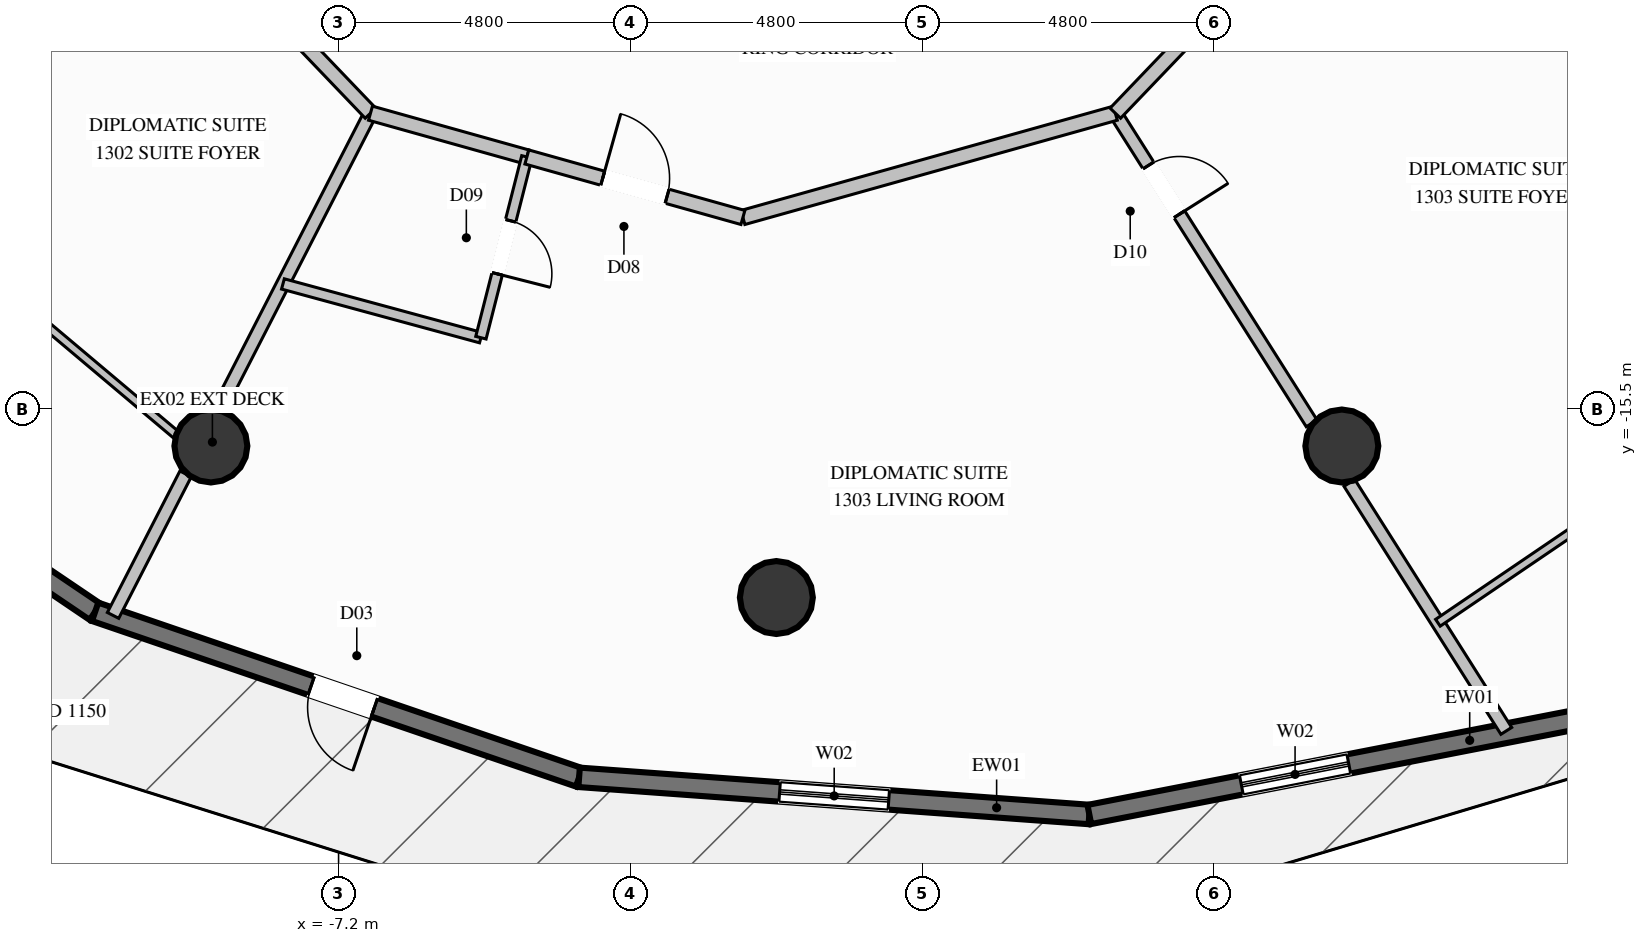
"""IFC4 building model, lengths in metres.
Left out: names, types, materials, properties, quantities, classifications, styles, units other than length and angle.
Written with IfcOpenShell. Run it as: python <this file> out.ifc"""

import sys

from ifc_helpers import new_model, si_unit, direction, frame, frame_2d, origin, origin_2d, place, context, subcontext, project, spatial, rectangle, circle, extrude, element, fill, save


model = new_model("IFC4")
c1 = context("Model", 3, precision=1e-05, world=origin(), true_north=direction((0.0, 1.0)))
c2 = subcontext(c1, "Body", "Model", "MODEL_VIEW")
j1 = project(units=[si_unit("LENGTHUNIT", "METRE"), si_unit("PLANEANGLEUNIT", "RADIAN")], contexts=[c1])
p1 = place(None, origin())
s1 = spatial("IfcSite", under=j1, at=p1, CompositionType="ELEMENT")
p2 = place(p1, origin())
s2 = spatial("IfcBuilding", under=s1, at=p2, CompositionType="ELEMENT")
p3 = place(p2, frame((0.0, 0.0, 50.0)))
s3 = spatial("IfcBuildingStorey", under=s2, at=p3, CompositionType="ELEMENT", Elevation=50.0)
for number, where, z_axis, x_axis in (
    (1, (-9.3, -16.108, 0.0), (0.0, 0.0, 1.0), (1.0, 0.0, 0.0)),
    (2, (0.0, -18.6, 0.0), (0.0, 0.0, 1.0), (1.0, 0.0, 0.0)),
    (3, (9.3, -16.108, 0.0), (0.0, 0.0, 1.0), (1.0, 0.0, 0.0)),
):
    element("IfcColumn", number, at=place(p3, frame(where, z_axis=z_axis, x_axis=x_axis)), inside=s3, PredefinedType="COLUMN", context=c2, shape_type="SweptSolid", body=[
        extrude(circle(Radius=0.6, at=origin_2d()), origin(), (0.0, 0.0, 1.0), 3.6),
    ])
p4 = place(p3, frame((-11.204, -18.835, 0.0), z_axis=(0.0, 0.0, 1.0), x_axis=(-0.828391352283, 0.560149772349, 0.0)))
e4 = element("IfcWall", 4, at=p4, inside=s3, PredefinedType="SOLIDWALL", context=c2, shape_type="SweptSolid", body=[
    extrude(rectangle(XDim=8.149, YDim=0.32, at=frame_2d((4.075, 0.0))), origin(), (0.0, 0.0, 1.0), 3.34),
])
p5 = place(p4, frame((3.175, 0.0, 0.35)))
e5 = element("IfcOpeningElement", 5, at=p5, cuts=e4, PredefinedType="OPENING", context=c2, shape_type="SweptSolid", body=[
    extrude(rectangle(XDim=1.8, YDim=2.6, at=frame_2d((0.9, 1.3))), frame((0.0, 0.17, 0.0), z_axis=(0.0, -1.0, 0.0), x_axis=(1.0, 0.0, 0.0)), (0.0, 0.0, 1.0), 0.34),
])
p6 = place(p3, frame((-3.244, -21.557, 0.0), z_axis=(0.0, 0.0, 1.0), x_axis=(-0.94621145459, 0.323548888429, 0.0)))
e6 = element("IfcWall", 6, at=p6, inside=s3, PredefinedType="SOLIDWALL", context=c2, shape_type="SweptSolid", body=[
    extrude(rectangle(XDim=8.413, YDim=0.32, at=frame_2d((4.206, 0.0))), origin(), (0.0, 0.0, 1.0), 3.34),
])
p7 = place(p6, frame((3.557, 0.0, 0.0)))
e7 = element("IfcOpeningElement", 7, at=p7, cuts=e6, PredefinedType="OPENING", context=c2, shape_type="SweptSolid", body=[
    extrude(rectangle(XDim=1.1, YDim=2.2, at=frame_2d((0.55, 1.1))), frame((0.0, 0.17, 0.0), z_axis=(0.0, -1.0, 0.0), x_axis=(1.0, 0.0, 0.0)), (0.0, 0.0, 1.0), 0.34),
])
p8 = place(p3, frame((5.147, -22.168, 0.0), z_axis=(0.0, 0.0, 1.0), x_axis=(-0.997358597799, 0.072634891044, 0.0)))
e8 = element("IfcWall", 8, at=p8, inside=s3, PredefinedType="SOLIDWALL", context=c2, shape_type="SweptSolid", body=[
    extrude(rectangle(XDim=8.413, YDim=0.32, at=frame_2d((4.207, 0.0))), origin(), (0.0, 0.0, 1.0), 3.34),
])
p9 = place(p8, frame((3.307, 0.0, 0.35)))
e9 = element("IfcOpeningElement", 9, at=p9, cuts=e8, PredefinedType="OPENING", context=c2, shape_type="SweptSolid", body=[
    extrude(rectangle(XDim=1.8, YDim=2.6, at=frame_2d((0.9, 1.3))), frame((0.0, 0.17, 0.0), z_axis=(0.0, -1.0, 0.0), x_axis=(1.0, 0.0, 0.0)), (0.0, 0.0, 1.0), 0.34),
])
p10 = place(p3, frame((13.146, -20.609, 0.0), z_axis=(0.0, 0.0, 1.0), x_axis=(-0.981529850993, -0.191309047382, 0.0)))
e10 = element("IfcWall", 10, at=p10, inside=s3, PredefinedType="SOLIDWALL", context=c2, shape_type="SweptSolid", body=[
    extrude(rectangle(XDim=8.15, YDim=0.32, at=frame_2d((4.075, 0.0))), origin(), (0.0, 0.0, 1.0), 3.34),
])
p11 = place(p10, frame((3.802, 0.0, 0.35)))
e11 = element("IfcOpeningElement", 11, at=p11, cuts=e10, PredefinedType="OPENING", context=c2, shape_type="SweptSolid", body=[
    extrude(rectangle(XDim=1.8, YDim=2.6, at=frame_2d((0.9, 1.3))), frame((0.0, 0.17, 0.0), z_axis=(0.0, -1.0, 0.0), x_axis=(1.0, 0.0, 0.0)), (0.0, 0.0, 1.0), 0.34),
])
p12 = place(p3, frame((-6.675, -10.635, 0.0), z_axis=(0.0, 0.0, 1.0), x_axis=(-0.456172544556, -0.889891347072, 0.0)))
e12 = element("IfcWall", 12, at=p12, inside=s3, PredefinedType="PARTITIONING", context=c2, shape_type="SweptSolid", body=[
    extrude(rectangle(XDim=5.469, YDim=0.21, at=frame_2d((2.735, 0.0))), origin(), (0.0, 0.0, 1.0), 2.708),
])
p13 = place(p3, frame((-9.716, -16.567, 0.0), z_axis=(0.0, 0.0, 1.0), x_axis=(-0.456153637775, -0.889901038737, 0.0)))
e13 = element("IfcWall", 13, at=p13, inside=s3, PredefinedType="PARTITIONING", context=c2, shape_type="SweptSolid", body=[
    extrude(rectangle(XDim=2.615, YDim=0.21, at=frame_2d((1.308, 0.0))), origin(), (0.0, 0.0, 1.0), 3.34),
])
p14 = place(p3, frame((5.575, -10.635, 0.0), z_axis=(0.0, 0.0, 1.0), x_axis=(0.534853877246, -0.844944572144, 0.0)))
e14 = element("IfcWall", 14, at=p14, inside=s3, PredefinedType="PARTITIONING", context=c2, shape_type="SweptSolid", body=[
    extrude(rectangle(XDim=6.037, YDim=0.21, at=frame_2d((3.019, 0.0))), origin(), (0.0, 0.0, 1.0), 2.708),
])
p15 = place(p14, frame((1.017, 0.0, 0.0)))
e15 = element("IfcOpeningElement", 15, at=p15, cuts=e14, PredefinedType="OPENING", context=c2, shape_type="SweptSolid", body=[
    extrude(rectangle(XDim=0.95, YDim=2.1, at=frame_2d((0.475, 1.05))), frame((0.0, 0.115, 0.0), z_axis=(0.0, -1.0, 0.0), x_axis=(1.0, 0.0, 0.0)), (0.0, 0.0, 1.0), 0.23),
])
p16 = place(p3, frame((9.424, -16.715, 0.0), z_axis=(0.0, 0.0, 1.0), x_axis=(0.534778847244, -0.844992061821, 0.0)))
e16 = element("IfcWall", 16, at=p16, inside=s3, PredefinedType="PARTITIONING", context=c2, shape_type="SweptSolid", body=[
    extrude(rectangle(XDim=4.826, YDim=0.21, at=frame_2d((2.413, 0.0))), origin(), (0.0, 0.0, 1.0), 3.34),
])
p17 = place(p3, frame((-11.159, -5.95, 0.0), z_axis=(0.0, 0.0, 1.0), x_axis=(0.691426053968, -0.722447238138, 0.0)))
e17 = element("IfcWall", 17, at=p17, inside=s3, PredefinedType="PARTITIONING", context=c2, shape_type="SweptSolid", body=[
    extrude(rectangle(XDim=6.485, YDim=0.24, at=frame_2d((3.242, 0.0))), origin(), (0.0, 0.0, 1.0), 3.34),
])
p18 = place(p3, frame((-17.187, -9.763, 0.0), z_axis=(0.0, 0.0, 1.0), x_axis=(0.764837174909, -0.644223638092, 0.0)))
e18 = element("IfcWall", 18, at=p18, inside=s3, PredefinedType="PARTITIONING", context=c2, shape_type="SweptSolid", body=[
    extrude(rectangle(XDim=10.007, YDim=0.135, at=frame_2d((5.004, 0.0))), origin(), (0.0, 0.0, 1.0), 2.792),
])
p19 = place(p18, frame((4.529, 0.0, 0.0)))
e19 = element("IfcOpeningElement", 19, at=p19, cuts=e18, PredefinedType="OPENING", context=c2, shape_type="SweptSolid", body=[
    extrude(rectangle(XDim=0.95, YDim=2.1, at=frame_2d((0.475, 1.05))), frame((0.0, 0.078, 0.0), z_axis=(0.0, -1.0, 0.0), x_axis=(1.0, 0.0, 0.0)), (0.0, 0.0, 1.0), 0.155),
])
p20 = place(p3, frame((-6.675, -10.635, 0.0), z_axis=(0.0, 0.0, 1.0), x_axis=(0.962983004146, -0.269562114782, 0.0)))
e20 = element("IfcWall", 20, at=p20, inside=s3, PredefinedType="PARTITIONING", context=c2, shape_type="SweptSolid", body=[
    extrude(rectangle(XDim=2.671, YDim=0.24, at=frame_2d((1.335, 0.0))), origin(), (0.0, 0.0, 1.0), 3.34),
])
p21 = place(p3, frame((-8.115, -13.443, 0.0), z_axis=(0.0, 0.0, 1.0), x_axis=(0.96508205858, -0.261947743275, 0.0)))
e21 = element("IfcWall", 21, at=p21, inside=s3, PredefinedType="PLUMBINGWALL", context=c2, shape_type="SweptSolid", body=[
    extrude(rectangle(XDim=3.374, YDim=0.175, at=frame_2d((1.687, 0.0))), origin(), (0.0, 0.0, 1.0), 3.34),
])
p22 = place(p3, frame((-4.103, -11.355, 0.0), z_axis=(0.0, 0.0, 1.0), x_axis=(-0.246486233644, -0.969146292684, 0.0)))
e22 = element("IfcWall", 22, at=p22, inside=s3, PredefinedType="PLUMBINGWALL", context=c2, shape_type="SweptSolid", body=[
    extrude(rectangle(XDim=3.067, YDim=0.175, at=frame_2d((1.533, 0.0))), origin(), (0.0, 0.0, 1.0), 3.34),
])
p23 = place(p22, frame((1.083, 0.0, 0.0)))
e23 = element("IfcOpeningElement", 23, at=p23, cuts=e22, PredefinedType="OPENING", context=c2, shape_type="SweptSolid", body=[
    extrude(rectangle(XDim=0.9, YDim=2.1, at=frame_2d((0.45, 1.05))), frame((0.0, 0.098, 0.0), z_axis=(0.0, -1.0, 0.0), x_axis=(1.0, 0.0, 0.0)), (0.0, 0.0, 1.0), 0.195),
])
p24 = place(p3, frame((-0.55, -12.35, 0.0), z_axis=(0.0, 0.0, 1.0), x_axis=(0.962960431872, 0.269642738915, 0.0)))
e24 = element("IfcWall", 24, at=p24, inside=s3, PredefinedType="PARTITIONING", context=c2, shape_type="SweptSolid", body=[
    extrude(rectangle(XDim=6.361, YDim=0.24, at=frame_2d((3.18, 0.0))), origin(), (0.0, 0.0, 1.0), 2.919),
])
p25 = place(p3, frame((-4.103, -11.355, 0.0), z_axis=(0.0, 0.0, 1.0), x_axis=(0.962944088122, -0.269701099648, 0.0)))
e25 = element("IfcWall", 25, at=p25, inside=s3, PredefinedType="PARTITIONING", context=c2, shape_type="SweptSolid", body=[
    extrude(rectangle(XDim=3.69, YDim=0.24, at=frame_2d((1.845, 0.0))), origin(), (0.0, 0.0, 1.0), 2.919),
])
p26 = place(p25, frame((1.295, 0.0, 0.0)))
e26 = element("IfcOpeningElement", 26, at=p26, cuts=e25, PredefinedType="OPENING", context=c2, shape_type="SweptSolid", body=[
    extrude(rectangle(XDim=1.1, YDim=2.3, at=frame_2d((0.55, 1.15))), frame((0.0, 0.13, 0.0), z_axis=(0.0, -1.0, 0.0), x_axis=(1.0, 0.0, 0.0)), (0.0, 0.0, 1.0), 0.26),
])
p27 = place(p3, frame((5.575, -10.635, 0.0), z_axis=(0.0, 0.0, 1.0), x_axis=(0.691445702336, 0.722428432941, 0.0)))
e27 = element("IfcWall", 27, at=p27, inside=s3, PredefinedType="PARTITIONING", context=c2, shape_type="SweptSolid", body=[
    extrude(rectangle(XDim=6.485, YDim=0.24, at=frame_2d((3.243, 0.0))), origin(), (0.0, 0.0, 1.0), 3.34),
])
p28 = place(p3, frame((10.88, -19.015, 0.0), z_axis=(0.0, 0.0, 1.0), x_axis=(0.827254691241, 0.561827087119, 0.0)))
e28 = element("IfcWall", 28, at=p28, inside=s3, PredefinedType="PARTITIONING", context=c2, shape_type="SweptSolid", body=[
    extrude(rectangle(XDim=12.226, YDim=0.135, at=frame_2d((6.113, 0.0))), origin(), (0.0, 0.0, 1.0), 3.34),
])
p29 = place(p28, frame((5.638, 0.0, 0.0)))
e29 = element("IfcOpeningElement", 29, at=p29, cuts=e28, PredefinedType="OPENING", context=c2, shape_type="SweptSolid", body=[
    extrude(rectangle(XDim=0.95, YDim=2.1, at=frame_2d((0.475, 1.05))), frame((0.0, 0.078, 0.0), z_axis=(0.0, -1.0, 0.0), x_axis=(1.0, 0.0, 0.0)), (0.0, 0.0, 1.0), 0.155),
])
p30 = place(p7, origin())
e30 = element("IfcDoor", 30, at=p30, inside=s3, OperationType="SINGLE_SWING_LEFT", PredefinedType="DOOR", context=c2, shape_type="SweptSolid", body=[
    extrude(rectangle(XDim=1.1, YDim=2.2, at=frame_2d((0.55, 1.1))), frame((0.0, 0.025, 0.0), z_axis=(0.0, -1.0, 0.0), x_axis=(1.0, 0.0, 0.0)), (0.0, 0.0, 1.0), 0.05),
])
fill(e7, e30)
p31 = place(p9, origin())
e31 = element("IfcWindow", 31, at=p31, inside=s3, PartitioningType="SINGLE_PANEL", PredefinedType="WINDOW", context=c2, shape_type="SweptSolid", body=[
    extrude(rectangle(XDim=1.8, YDim=2.6, at=frame_2d((0.9, 1.3))), frame((0.0, 0.03, 0.0), z_axis=(0.0, -1.0, 0.0), x_axis=(1.0, 0.0, 0.0)), (0.0, 0.0, 1.0), 0.06),
])
fill(e9, e31)
p32 = place(p11, origin())
e32 = element("IfcWindow", 32, at=p32, inside=s3, PartitioningType="SINGLE_PANEL", PredefinedType="WINDOW", context=c2, shape_type="SweptSolid", body=[
    extrude(rectangle(XDim=1.8, YDim=2.6, at=frame_2d((0.9, 1.3))), frame((0.0, 0.03, 0.0), z_axis=(0.0, -1.0, 0.0), x_axis=(1.0, 0.0, 0.0)), (0.0, 0.0, 1.0), 0.06),
])
fill(e11, e32)
p33 = place(p23, origin())
e33 = element("IfcDoor", 33, at=p33, inside=s3, OperationType="SINGLE_SWING_RIGHT", PredefinedType="DOOR", context=c2, shape_type="SweptSolid", body=[
    extrude(rectangle(XDim=0.9, YDim=2.1, at=frame_2d((0.45, 1.05))), frame((0.0, 0.025, 0.0), z_axis=(0.0, -1.0, 0.0), x_axis=(1.0, 0.0, 0.0)), (0.0, 0.0, 1.0), 0.05),
])
fill(e23, e33)
p34 = place(p26, origin())
e34 = element("IfcDoor", 34, at=p34, inside=s3, OperationType="SINGLE_SWING_LEFT", PredefinedType="DOOR", context=c2, shape_type="SweptSolid", body=[
    extrude(rectangle(XDim=1.1, YDim=2.3, at=frame_2d((0.55, 1.15))), frame((0.0, 0.025, 0.0), z_axis=(0.0, -1.0, 0.0), x_axis=(1.0, 0.0, 0.0)), (0.0, 0.0, 1.0), 0.05),
])
fill(e26, e34)
p35 = place(p15, origin())
e35 = element("IfcDoor", 35, at=p35, inside=s3, OperationType="SINGLE_SWING_RIGHT", PredefinedType="DOOR", context=c2, shape_type="SweptSolid", body=[
    extrude(rectangle(XDim=0.95, YDim=2.1, at=frame_2d((0.475, 1.05))), frame((0.0, 0.025, 0.0), z_axis=(0.0, -1.0, 0.0), x_axis=(1.0, 0.0, 0.0)), (0.0, 0.0, 1.0), 0.05),
])
fill(e15, e35)
save(model, sys.argv[1])
